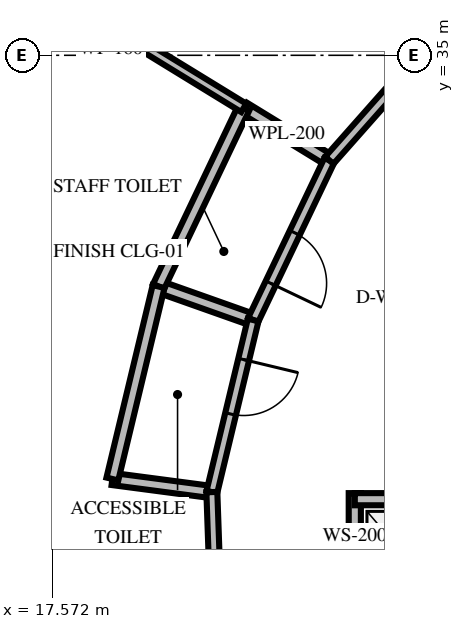
"""IFC4 building model, lengths in metres.
Left out: names, types, materials, properties, quantities, classifications, styles, units other than length and angle.
Written with IfcOpenShell. Run it as: python <this file> out.ifc"""

import sys

from ifc_helpers import new_model, si_unit, direction, frame, frame_2d, origin, place, context, subcontext, project, spatial, rectangle, extrude, element, fill, save


model = new_model("IFC4")
c1 = context("Model", 3, precision=1e-05, world=origin(), true_north=direction((0.0, 1.0)))
c2 = subcontext(c1, "Body", "Model", "MODEL_VIEW")
j1 = project(units=[si_unit("LENGTHUNIT", "METRE"), si_unit("PLANEANGLEUNIT", "RADIAN")], contexts=[c1])
p1 = place(None, origin())
s1 = spatial("IfcSite", under=j1, at=p1, CompositionType="ELEMENT")
p2 = place(p1, origin())
s2 = spatial("IfcBuilding", under=s1, at=p2, CompositionType="ELEMENT")
p3 = place(p2, frame((0.0, 0.0, 153.8)))
s3 = spatial("IfcBuildingStorey", under=s2, at=p3, CompositionType="ELEMENT", Elevation=153.8)
p4 = place(p3, frame((20.883, 40.842, 0.0), z_axis=(0.0, 0.0, 1.0), x_axis=(-0.718470984441, -0.695556931182, 0.0)))
e1 = element("IfcWall", 1, at=p4, inside=s3, PredefinedType="SOLIDWALL", context=c2, shape_type="SweptSolid", body=[
    extrude(rectangle(XDim=8.673, YDim=0.3, at=frame_2d((4.336, 0.0))), origin(), (0.0, 0.0, 1.0), 2.86),
])
p5 = place(p4, frame((3.386, 0.0, 0.8)))
e2 = element("IfcOpeningElement", 2, at=p5, cuts=e1, PredefinedType="OPENING", context=c2, shape_type="SweptSolid", body=[
    extrude(rectangle(XDim=1.9, YDim=1.95, at=frame_2d((0.95, 0.975))), frame((0.0, 0.16, 0.0), z_axis=(0.0, -1.0, 0.0), x_axis=(1.0, 0.0, 0.0)), (0.0, 0.0, 1.0), 0.32),
])
p6 = place(p3, frame((22.55, 24.4, 0.0), z_axis=(0.0, 0.0, 1.0), x_axis=(0.0, 1.0, 0.0)))
e3 = element("IfcWall", 3, at=p6, inside=s3, PredefinedType="SOLIDWALL", context=c2, shape_type="SweptSolid", body=[
    extrude(rectangle(XDim=3.4, YDim=0.2, at=frame_2d((1.7, 0.0))), origin(), (0.0, 0.0, 1.0), 2.76),
])
p7 = place(p6, frame((0.7, 0.0, 0.0)))
e4 = element("IfcOpeningElement", 4, at=p7, cuts=e3, PredefinedType="OPENING", context=c2, shape_type="SweptSolid", body=[
    extrude(rectangle(XDim=1.8, YDim=2.4, at=frame_2d((0.9, 1.2))), frame((0.0, 0.11, 0.0), z_axis=(0.0, -1.0, 0.0), x_axis=(1.0, 0.0, 0.0)), (0.0, 0.0, 1.0), 0.22),
])
p8 = place(p3, frame((22.55, 27.7, 0.0), z_axis=(0.0, 0.0, 1.0), x_axis=(1.0, 0.0, 0.0)))
e5 = element("IfcWall", 5, at=p8, inside=s3, PredefinedType="SOLIDWALL", context=c2, shape_type="SweptSolid", body=[
    extrude(rectangle(XDim=2.8, YDim=0.2, at=frame_2d((1.4, 0.0))), origin(), (0.0, 0.0, 1.0), 2.76),
])
p9 = place(p3, frame((22.131, 33.273, 0.0), z_axis=(0.0, 0.0, 1.0), x_axis=(-0.852637404857, 0.52250306778, 0.0)))
e6 = element("IfcWall", 6, at=p9, inside=s3, PredefinedType="PLUMBINGWALL", context=c2, shape_type="SweptSolid", body=[
    extrude(rectangle(XDim=1.65, YDim=0.2, at=frame_2d((0.825, 0.0))), origin(), (0.0, 0.0, 1.0), 2.76),
])
p10 = place(p3, frame((20.878, 30.646, 0.0), z_axis=(0.0, 0.0, 1.0), x_axis=(-0.942599092198, 0.33392656586, 0.0)))
e7 = element("IfcWall", 7, at=p10, inside=s3, PredefinedType="PLUMBINGWALL", context=c2, shape_type="SweptSolid", body=[
    extrude(rectangle(XDim=1.65, YDim=0.2, at=frame_2d((0.825, 0.0))), origin(), (0.0, 0.0, 1.0), 2.76),
])
p11 = place(p3, frame((20.724, 34.135, 0.0), z_axis=(0.0, 0.0, 1.0), x_axis=(-0.430544913424, -0.902569153874, 0.0)))
e8 = element("IfcWall", 8, at=p11, inside=s3, PredefinedType="PLUMBINGWALL", context=c2, shape_type="SweptSolid", body=[
    extrude(rectangle(XDim=3.255, YDim=0.2, at=frame_2d((1.627, 0.0))), origin(), (0.0, 0.0, 1.0), 2.76),
])
p12 = place(p3, frame((22.131, 33.273, 0.0), z_axis=(0.0, 0.0, 1.0), x_axis=(-0.43045780382, -0.90261070187, 0.0)))
e9 = element("IfcWall", 9, at=p12, inside=s3, PredefinedType="PARTITIONING", context=c2, shape_type="SweptSolid", body=[
    extrude(rectangle(XDim=2.91, YDim=0.18, at=frame_2d((1.455, 0.0))), origin(), (0.0, 0.0, 1.0), 2.76),
])
p13 = place(p12, frame((1.321, 0.0, 0.0)))
e10 = element("IfcOpeningElement", 10, at=p13, cuts=e9, PredefinedType="OPENING", context=c2, shape_type="SweptSolid", body=[
    extrude(rectangle(XDim=0.92, YDim=2.1, at=frame_2d((0.46, 1.05))), frame((0.0, 0.1, 0.0), z_axis=(0.0, -1.0, 0.0), x_axis=(1.0, 0.0, 0.0)), (0.0, 0.0, 1.0), 0.2),
])
p14 = place(p3, frame((20.199, 27.817, 0.0), z_axis=(0.0, 0.0, 1.0), x_axis=(-0.991448755136, 0.130496612749, 0.0)))
e11 = element("IfcWall", 11, at=p14, inside=s3, PredefinedType="PLUMBINGWALL", context=c2, shape_type="SweptSolid", body=[
    extrude(rectangle(XDim=1.65, YDim=0.2, at=frame_2d((0.825, 0.0))), origin(), (0.0, 0.0, 1.0), 2.76),
])
p15 = place(p3, frame((19.323, 31.198, 0.0), z_axis=(0.0, 0.0, 1.0), x_axis=(-0.233401318648, -0.972380493661, 0.0)))
e12 = element("IfcWall", 12, at=p15, inside=s3, PredefinedType="PLUMBINGWALL", context=c2, shape_type="SweptSolid", body=[
    extrude(rectangle(XDim=3.255, YDim=0.2, at=frame_2d((1.627, 0.0))), origin(), (0.0, 0.0, 1.0), 2.76),
])
p16 = place(p3, frame((20.878, 30.646, 0.0), z_axis=(0.0, 0.0, 1.0), x_axis=(-0.233404683879, -0.972379685896, 0.0)))
e13 = element("IfcWall", 13, at=p16, inside=s3, PredefinedType="PARTITIONING", context=c2, shape_type="SweptSolid", body=[
    extrude(rectangle(XDim=2.91, YDim=0.18, at=frame_2d((1.455, 0.0))), origin(), (0.0, 0.0, 1.0), 2.76),
])
p17 = place(p16, frame((0.669, 0.0, 0.0)))
e14 = element("IfcOpeningElement", 14, at=p17, cuts=e13, PredefinedType="OPENING", context=c2, shape_type="SweptSolid", body=[
    extrude(rectangle(XDim=0.92, YDim=2.1, at=frame_2d((0.46, 1.05))), frame((0.0, 0.1, 0.0), z_axis=(0.0, -1.0, 0.0), x_axis=(1.0, 0.0, 0.0)), (0.0, 0.0, 1.0), 0.2),
])
p18 = place(p3, frame((20.724, 34.135, 0.0), z_axis=(0.0, 0.0, 1.0), x_axis=(-0.852638869346, 0.522500677972, 0.0)))
e15 = element("IfcWall", 15, at=p18, inside=s3, PredefinedType="PARTITIONING", context=c2, shape_type="SweptSolid", body=[
    extrude(rectangle(XDim=5.13, YDim=0.16, at=frame_2d((2.565, 0.0))), origin(), (0.0, 0.0, 1.0), 2.76),
])
p19 = place(p3, frame((20.199, 27.817, 0.0), z_axis=(0.0, 0.0, 1.0), x_axis=(0.034855727819, -0.999392354503, 0.0)))
e16 = element("IfcWall", 16, at=p19, inside=s3, PredefinedType="PARTITIONING", context=c2, shape_type="SweptSolid", body=[
    extrude(rectangle(XDim=4.595, YDim=0.18, at=frame_2d((2.297, 0.0))), origin(), (0.0, 0.0, 1.0), 2.76),
])
p20 = place(p3, frame((25.335, 36.894, 0.0), z_axis=(0.0, 0.0, 1.0), x_axis=(-0.662663227166, -0.748917517061, 0.0)))
e17 = element("IfcWall", 17, at=p20, inside=s3, PredefinedType="PARTITIONING", context=c2, shape_type="SweptSolid", body=[
    extrude(rectangle(XDim=4.834, YDim=0.18, at=frame_2d((2.417, 0.0))), origin(), (0.0, 0.0, 1.0), 2.76),
])
p21 = place(p20, frame((1.034, 0.0, 0.0)))
e18 = element("IfcOpeningElement", 18, at=p21, cuts=e17, PredefinedType="OPENING", context=c2, shape_type="SweptSolid", body=[
    extrude(rectangle(XDim=1.0, YDim=2.15, at=frame_2d((0.5, 1.075))), frame((0.0, 0.1, 0.0), z_axis=(0.0, -1.0, 0.0), x_axis=(1.0, 0.0, 0.0)), (0.0, 0.0, 1.0), 0.2),
])
p22 = place(p7, origin())
e19 = element("IfcDoor", 19, at=p22, inside=s3, OperationType="DOUBLE_DOOR_SLIDING", PredefinedType="USERDEFINED", context=c2, shape_type="SweptSolid", body=[
    extrude(rectangle(XDim=1.8, YDim=2.4, at=frame_2d((0.9, 1.2))), frame((0.0, 0.025, 0.0), z_axis=(0.0, -1.0, 0.0), x_axis=(1.0, 0.0, 0.0)), (0.0, 0.0, 1.0), 0.05),
])
fill(e4, e19)
p23 = place(p13, origin())
e20 = element("IfcDoor", 20, at=p23, inside=s3, OperationType="SINGLE_SWING_RIGHT", PredefinedType="DOOR", context=c2, shape_type="SweptSolid", body=[
    extrude(rectangle(XDim=0.92, YDim=2.1, at=frame_2d((0.46, 1.05))), frame((0.0, 0.025, 0.0), z_axis=(0.0, -1.0, 0.0), x_axis=(1.0, 0.0, 0.0)), (0.0, 0.0, 1.0), 0.05),
])
fill(e10, e20)
p24 = place(p17, origin())
e21 = element("IfcDoor", 21, at=p24, inside=s3, OperationType="SINGLE_SWING_LEFT", PredefinedType="DOOR", context=c2, shape_type="SweptSolid", body=[
    extrude(rectangle(XDim=0.92, YDim=2.1, at=frame_2d((0.46, 1.05))), frame((0.0, 0.025, 0.0), z_axis=(0.0, -1.0, 0.0), x_axis=(1.0, 0.0, 0.0)), (0.0, 0.0, 1.0), 0.05),
])
fill(e14, e21)
save(model, sys.argv[1])
